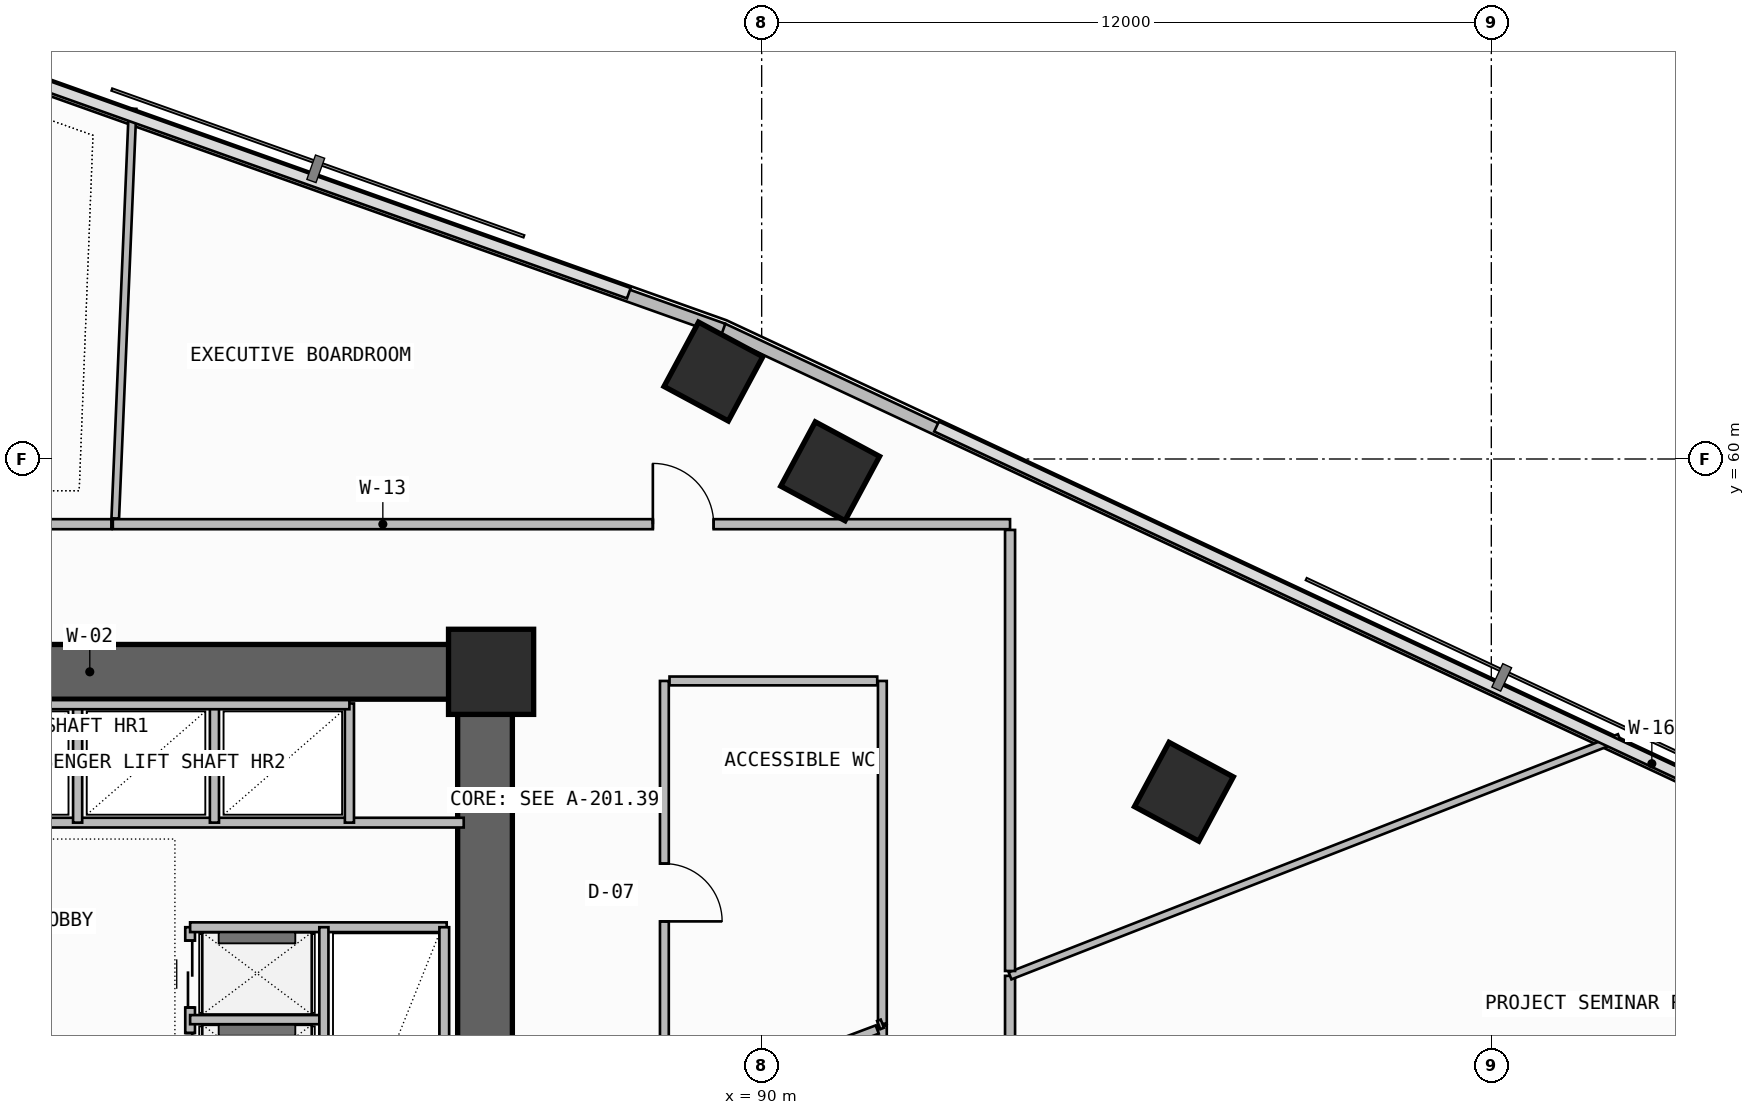
"""IFC4 building model, lengths in metres.
Left out: names, types, materials, properties, quantities, classifications, styles, units other than length and angle.
Written with IfcOpenShell. Run it as: python <this file> out.ifc"""

import sys

from ifc_helpers import new_model, si_unit, direction, frame, frame_2d, origin, origin_2d, place, context, subcontext, project, spatial, rectangle, extrude, element, fill, save


model = new_model("IFC4")
c1 = context("Model", 3, precision=1e-05, world=origin(), true_north=direction((0.0, 1.0)))
c2 = subcontext(c1, "Body", "Model", "MODEL_VIEW")
j1 = project(units=[si_unit("LENGTHUNIT", "METRE"), si_unit("PLANEANGLEUNIT", "RADIAN")], contexts=[c1])
p1 = place(None, origin())
s1 = spatial("IfcSite", under=j1, at=p1, CompositionType="ELEMENT")
p2 = place(p1, origin())
s2 = spatial("IfcBuilding", under=s1, at=p2, CompositionType="ELEMENT")
p3 = place(p2, frame((0.0, 0.0, 139.5)))
s3 = spatial("IfcBuildingStorey", under=s2, at=p3, CompositionType="ELEMENT", Elevation=139.5)
p4 = place(p3, frame((72.0, 56.5, -0.26), z_axis=(0.0, 0.0, 1.0), x_axis=(1.0, 0.0, 0.0)))
e1 = element("IfcWall", 1, at=p4, inside=s3, PredefinedType="SHEAR", context=c2, shape_type="SweptSolid", body=[
    extrude(rectangle(XDim=13.9, YDim=0.9, at=frame_2d((6.95, 0.0))), origin(), (0.0, 0.0, 1.0), 3.6),
])
p5 = place(p3, frame((85.45, 47.6, -0.26), z_axis=(0.0, 0.0, 1.0), x_axis=(0.0, 1.0, 0.0)))
e2 = element("IfcWall", 2, at=p5, inside=s3, PredefinedType="SHEAR", context=c2, shape_type="SweptSolid", body=[
    extrude(rectangle(XDim=8.45, YDim=0.9, at=frame_2d((4.225, 0.0))), origin(), (0.0, 0.0, 1.0), 3.6),
])
p6 = place(p3, frame((85.55, 56.5, 0.0), z_axis=(0.0, 0.0, 1.0), x_axis=(1.0, 0.0, 0.0)))
e3 = element("IfcColumn", 3, at=p6, inside=s3, PredefinedType="COLUMN", context=c2, shape_type="SweptSolid", body=[
    extrude(rectangle(XDim=1.4, YDim=1.4, at=origin_2d()), origin(), (0.0, 0.0, 1.0), 3.6),
])
for number, where, z_axis, x_axis in (
    (4, (96.944, 54.528, 0.0), (0.0, 0.0, 1.0), (0.473, 0.881, 0.0)),
    (5, (91.126, 59.798, 0.0), (0.0, 0.0, 1.0), (0.473, 0.881, 0.0)),
    (6, (89.207, 61.438, 0.0), (0.0, 0.0, 1.0), (0.473, 0.881, 0.0)),
):
    element("IfcColumn", number, at=place(p3, frame(where, z_axis=z_axis, x_axis=x_axis)), inside=s3, PredefinedType="COLUMN", context=c2, shape_type="SweptSolid", body=[
        extrude(rectangle(XDim=1.2, YDim=1.2, at=origin_2d()), origin(), (0.0, 0.0, 1.0), 3.6),
    ])
p7 = place(p3, frame((119.926, 47.843, 0.0), z_axis=(0.0, 0.0, 1.0), x_axis=(-0.905880730846, 0.423532881228, 0.0)))
e7 = element("IfcWall", 7, at=p7, inside=s3, PredefinedType="PARAPET", context=c2, shape_type="SweptSolid", body=[
    extrude(rectangle(XDim=33.748, YDim=0.2, at=frame_2d((16.874, 0.0))), origin(), (0.0, 0.0, 1.0), 1.15),
])
p8 = place(p3, frame((89.368, 62.13, 0.0), z_axis=(0.0, 0.0, 1.0), x_axis=(-0.942033439765, 0.335518998515, 0.0)))
e8 = element("IfcWall", 8, at=p8, inside=s3, PredefinedType="PARAPET", context=c2, shape_type="SweptSolid", body=[
    extrude(rectangle(XDim=27.969, YDim=0.2, at=frame_2d((13.985, 0.0))), origin(), (0.0, 0.0, 1.0), 1.15),
])
p9 = place(p3, frame((80.6, 47.7, 0.0), z_axis=(0.0, 0.0, 1.0), x_axis=(0.0, 1.0, 0.0)))
e9 = element("IfcWall", 9, at=p9, inside=s3, PredefinedType="SOLIDWALL", context=c2, shape_type="SweptSolid", body=[
    extrude(rectangle(XDim=4.6, YDim=0.16, at=frame_2d((2.3, 0.0))), origin(), (0.0, 0.0, 1.0), 3.34),
])
p10 = place(p9, frame((0.24, 0.0, 0.0)))
e10 = element("IfcOpeningElement", 10, at=p10, cuts=e9, PredefinedType="OPENING", context=c2, shape_type="SweptSolid", body=[
    extrude(rectangle(XDim=1.1, YDim=2.25, at=frame_2d((0.55, 1.125))), frame((0.0, 0.09, 0.0), z_axis=(0.0, -1.0, 0.0), x_axis=(1.0, 0.0, 0.0)), (0.0, 0.0, 1.0), 0.18),
])
p11 = place(p9, frame((1.76, 0.0, 0.0)))
e11 = element("IfcOpeningElement", 11, at=p11, cuts=e9, PredefinedType="OPENING", context=c2, shape_type="SweptSolid", body=[
    extrude(rectangle(XDim=1.1, YDim=2.25, at=frame_2d((0.55, 1.125))), frame((0.0, 0.09, 0.0), z_axis=(0.0, -1.0, 0.0), x_axis=(1.0, 0.0, 0.0)), (0.0, 0.0, 1.0), 0.18),
])
p12 = place(p9, frame((3.28, 0.0, 0.0)))
e12 = element("IfcOpeningElement", 12, at=p12, cuts=e9, PredefinedType="OPENING", context=c2, shape_type="SweptSolid", body=[
    extrude(rectangle(XDim=1.1, YDim=2.25, at=frame_2d((0.55, 1.125))), frame((0.0, 0.09, 0.0), z_axis=(0.0, -1.0, 0.0), x_axis=(1.0, 0.0, 0.0)), (0.0, 0.0, 1.0), 0.18),
])
p13 = place(p3, frame((80.6, 52.3, 0.0), z_axis=(0.0, 0.0, 1.0), x_axis=(1.0, 0.0, 0.0)))
e13 = element("IfcWall", 13, at=p13, inside=s3, PredefinedType="SOLIDWALL", context=c2, shape_type="SweptSolid", body=[
    extrude(rectangle(XDim=4.22, YDim=0.16, at=frame_2d((2.11, 0.0))), origin(), (0.0, 0.0, 1.0), 3.34),
])
p14 = place(p3, frame((80.6, 50.78, 0.0), z_axis=(0.0, 0.0, 1.0), x_axis=(1.0, 0.0, 0.0)))
e14 = element("IfcWall", 14, at=p14, inside=s3, PredefinedType="PLUMBINGWALL", context=c2, shape_type="SweptSolid", body=[
    extrude(rectangle(XDim=2.2, YDim=0.15, at=frame_2d((1.1, 0.0))), origin(), (0.0, 0.0, 1.0), 3.34),
])
p15 = place(p3, frame((82.8, 47.7, 0.0), z_axis=(0.0, 0.0, 1.0), x_axis=(0.0, 1.0, 0.0)))
e15 = element("IfcWall", 15, at=p15, inside=s3, PredefinedType="PLUMBINGWALL", context=c2, shape_type="SweptSolid", body=[
    extrude(rectangle(XDim=4.6, YDim=0.15, at=frame_2d((2.3, 0.0))), origin(), (0.0, 0.0, 1.0), 3.34),
])
p16 = place(p3, frame((84.78, 47.7, 0.0), z_axis=(0.0, 0.0, 1.0), x_axis=(0.0, 1.0, 0.0)))
e16 = element("IfcWall", 16, at=p16, inside=s3, PredefinedType="SOLIDWALL", context=c2, shape_type="SweptSolid", body=[
    extrude(rectangle(XDim=4.6, YDim=0.16, at=frame_2d((2.3, 0.0))), origin(), (0.0, 0.0, 1.0), 3.34),
])
p17 = place(p3, frame((73.02, 54.02, 0.0), z_axis=(0.0, 0.0, 1.0), x_axis=(1.0, 0.0, 0.0)))
e17 = element("IfcWall", 17, at=p17, inside=s3, PredefinedType="SOLIDWALL", context=c2, shape_type="SweptSolid", body=[
    extrude(rectangle(XDim=12.08, YDim=0.16, at=frame_2d((6.04, 0.0))), origin(), (0.0, 0.0, 1.0), 3.34),
])
for number, where, z_axis, x_axis in (
    (18, (78.75, 54.02, 0.0), (0.0, 0.0, 1.0), (0.0, 1.0, 0.0)),
    (19, (81.0, 54.02, 0.0), (0.0, 0.0, 1.0), (0.0, 1.0, 0.0)),
):
    element("IfcWall", number, at=place(p3, frame(where, z_axis=z_axis, x_axis=x_axis)), inside=s3, PredefinedType="PLUMBINGWALL", context=c2, shape_type="SweptSolid", body=[
        extrude(rectangle(XDim=1.96, YDim=0.15, at=frame_2d((0.98, 0.0))), origin(), (0.0, 0.0, 1.0), 3.34),
    ])
p18 = place(p3, frame((83.22, 54.02, 0.0), z_axis=(0.0, 0.0, 1.0), x_axis=(0.0, 1.0, 0.0)))
e20 = element("IfcWall", 20, at=p18, inside=s3, PredefinedType="SOLIDWALL", context=c2, shape_type="SweptSolid", body=[
    extrude(rectangle(XDim=1.96, YDim=0.15, at=frame_2d((0.98, 0.0))), origin(), (0.0, 0.0, 1.0), 3.34),
])
p19 = place(p3, frame((76.52, 55.96, 0.0), z_axis=(0.0, 0.0, 1.0), x_axis=(1.0, 0.0, 0.0)))
e21 = element("IfcWall", 21, at=p19, inside=s3, PredefinedType="SOLIDWALL", context=c2, shape_type="SweptSolid", body=[
    extrude(rectangle(XDim=6.7, YDim=0.15, at=frame_2d((3.35, 0.0))), origin(), (0.0, 0.0, 1.0), 3.34),
])
p20 = place(p3, frame((94.085, 46.51, 0.0), z_axis=(0.0, 0.0, 1.0), x_axis=(0.0, 1.0, 0.0)))
e22 = element("IfcWall", 22, at=p20, inside=s3, PredefinedType="PARTITIONING", context=c2, shape_type="SweptSolid", body=[
    extrude(rectangle(XDim=4.991, YDim=0.165, at=frame_2d((2.496, 0.0))), origin(), (0.0, 0.0, 1.0), 2.725),
])
p21 = place(p20, frame((1.996, 0.0, 0.0)))
e23 = element("IfcOpeningElement", 23, at=p21, cuts=e22, PredefinedType="OPENING", context=c2, shape_type="SweptSolid", body=[
    extrude(rectangle(XDim=1.0, YDim=2.2, at=frame_2d((0.5, 1.1))), frame((0.0, 0.093, 0.0), z_axis=(0.0, -1.0, 0.0), x_axis=(1.0, 0.0, 0.0)), (0.0, 0.0, 1.0), 0.185),
])
p22 = place(p3, frame((94.085, 51.5, 0.0), z_axis=(0.0, 0.0, 1.0), x_axis=(0.931423458571, 0.363937275948, 0.0)))
e24 = element("IfcWall", 24, at=p22, inside=s3, PredefinedType="PARTITIONING", context=c2, shape_type="SweptSolid", body=[
    extrude(rectangle(XDim=10.759, YDim=0.125, at=frame_2d((5.379, 0.0))), origin(), (0.0, 0.0, 1.0), 2.725),
])
p23 = place(p3, frame((91.985, 50.688, 0.0), z_axis=(0.0, 0.0, 1.0), x_axis=(0.0, -1.0, 0.0)))
e25 = element("IfcWall", 25, at=p23, inside=s3, PredefinedType="PARTITIONING", context=c2, shape_type="SweptSolid", body=[
    extrude(rectangle(XDim=8.565, YDim=0.145, at=frame_2d((4.283, 0.0))), origin(), (0.0, 0.0, 1.0), 2.725),
])
p24 = place(p23, frame((3.833, 0.0, 0.0)))
e26 = element("IfcOpeningElement", 26, at=p24, cuts=e25, PredefinedType="OPENING", context=c2, shape_type="SweptSolid", body=[
    extrude(rectangle(XDim=0.9, YDim=2.1, at=frame_2d((0.45, 1.05))), frame((0.0, 0.083, 0.0), z_axis=(0.0, -1.0, 0.0), x_axis=(1.0, 0.0, 0.0)), (0.0, 0.0, 1.0), 0.165),
])
p25 = place(p3, frame((88.46, 49.324, 0.0), z_axis=(0.0, 0.0, 1.0), x_axis=(0.935982041956, 0.352047748376, 0.0)))
e27 = element("IfcWall", 27, at=p25, inside=s3, PredefinedType="PARTITIONING", context=c2, shape_type="SweptSolid", body=[
    extrude(rectangle(XDim=3.676, YDim=0.145, at=frame_2d((1.838, 0.0))), origin(), (0.0, 0.0, 1.0), 2.925),
])
p26 = place(p3, frame((88.4, 49.392, 0.0), z_axis=(0.0, 0.0, 1.0), x_axis=(0.0, 1.0, 0.0)))
e28 = element("IfcWall", 28, at=p26, inside=s3, PredefinedType="PARTITIONING", context=c2, shape_type="SweptSolid", body=[
    extrude(rectangle(XDim=6.958, YDim=0.145, at=frame_2d((3.479, 0.0))), origin(), (0.0, 0.0, 1.0), 2.725),
])
p27 = place(p26, frame((3.004, 0.0, 0.0)))
e29 = element("IfcOpeningElement", 29, at=p27, cuts=e28, PredefinedType="OPENING", context=c2, shape_type="SweptSolid", body=[
    extrude(rectangle(XDim=0.95, YDim=2.15, at=frame_2d((0.475, 1.075))), frame((0.0, 0.083, 0.0), z_axis=(0.0, -1.0, 0.0), x_axis=(1.0, 0.0, 0.0)), (0.0, 0.0, 1.0), 0.165),
])
p28 = place(p3, frame((91.985, 56.35, 0.0), z_axis=(0.0, 0.0, 1.0), x_axis=(0.0, -1.0, 0.0)))
e30 = element("IfcWall", 30, at=p28, inside=s3, PredefinedType="PARTITIONING", context=c2, shape_type="SweptSolid", body=[
    extrude(rectangle(XDim=5.636, YDim=0.145, at=frame_2d((2.818, 0.0))), origin(), (0.0, 0.0, 1.0), 2.725),
])
p29 = place(p3, frame((88.485, 56.35, 0.0), z_axis=(0.0, 0.0, 1.0), x_axis=(1.0, 0.0, 0.0)))
e31 = element("IfcWall", 31, at=p29, inside=s3, PredefinedType="PARTITIONING", context=c2, shape_type="SweptSolid", body=[
    extrude(rectangle(XDim=3.416, YDim=0.145, at=frame_2d((1.708, 0.0))), origin(), (0.0, 0.0, 1.0), 2.925),
])
p30 = place(p3, frame((91.985, 50.714, 0.0), z_axis=(0.0, 0.0, 1.0), x_axis=(-0.931577619485, -0.363542485653, 0.0)))
e32 = element("IfcWall", 32, at=p30, inside=s3, PredefinedType="PARTITIONING", context=c2, shape_type="SweptSolid", body=[
    extrude(rectangle(XDim=0.064, YDim=0.145, at=frame_2d((0.032, 0.0))), origin(), (0.0, 0.0, 1.0), 2.925),
])
p31 = place(p3, frame((94.085, 58.928, 0.0), z_axis=(0.0, 0.0, 1.0), x_axis=(-1.0, 0.0, 0.0)))
e33 = element("IfcWall", 33, at=p31, inside=s3, PredefinedType="PARTITIONING", context=c2, shape_type="SweptSolid", body=[
    extrude(rectangle(XDim=14.756, YDim=0.165, at=frame_2d((7.378, 0.0))), origin(), (0.0, 0.0, 1.0), 2.725),
])
p32 = place(p31, frame((4.875, 0.0, 0.0)))
e34 = element("IfcOpeningElement", 34, at=p32, cuts=e33, PredefinedType="OPENING", context=c2, shape_type="SweptSolid", body=[
    extrude(rectangle(XDim=1.0, YDim=2.2, at=frame_2d((0.5, 1.1))), frame((0.0, 0.093, 0.0), z_axis=(0.0, -1.0, 0.0), x_axis=(1.0, 0.0, 0.0)), (0.0, 0.0, 1.0), 0.185),
])
p33 = place(p3, frame((94.085, 51.581, 0.0), z_axis=(0.0, 0.0, 1.0), x_axis=(0.0, 1.0, 0.0)))
e35 = element("IfcWall", 35, at=p33, inside=s3, PredefinedType="PARTITIONING", context=c2, shape_type="SweptSolid", body=[
    extrude(rectangle(XDim=7.253, YDim=0.165, at=frame_2d((3.626, 0.0))), origin(), (0.0, 0.0, 1.0), 2.725),
])
p34 = place(p3, frame((79.369, 59.022, 0.0), z_axis=(0.0, 0.0, 1.0), x_axis=(0.042284055913, 0.999105629358, 0.0)))
e36 = element("IfcWall", 36, at=p34, inside=s3, PredefinedType="PARTITIONING", context=c2, shape_type="SweptSolid", body=[
    extrude(rectangle(XDim=6.744, YDim=0.125, at=frame_2d((3.372, 0.0))), origin(), (0.0, 0.0, 1.0), 3.34),
])
p35 = place(p3, frame((79.305, 58.928, 0.0), z_axis=(0.0, 0.0, 1.0), x_axis=(-1.0, 0.0, 0.0)))
e37 = element("IfcWall", 37, at=p35, inside=s3, PredefinedType="PARTITIONING", context=c2, shape_type="SweptSolid", body=[
    extrude(rectangle(XDim=9.94, YDim=0.165, at=frame_2d((4.97, 0.0))), origin(), (0.0, 0.0, 1.0), 2.725),
])
p36 = place(p35, frame((3.189, 0.0, 0.0)))
e38 = element("IfcOpeningElement", 38, at=p36, cuts=e37, PredefinedType="OPENING", context=c2, shape_type="SweptSolid", body=[
    extrude(rectangle(XDim=1.0, YDim=2.2, at=frame_2d((0.5, 1.1))), frame((0.0, 0.093, 0.0), z_axis=(0.0, -1.0, 0.0), x_axis=(1.0, 0.0, 0.0)), (0.0, 0.0, 1.0), 0.185),
])
p37 = place(p11, frame((1.1, 0.0, 0.0), z_axis=(0.0, 0.0, 1.0), x_axis=(-1.0, 0.0, 0.0)))
e39 = element("IfcDoor", 39, at=p37, inside=s3, OperationType="DOUBLE_DOOR_SLIDING", PredefinedType="DOOR", context=c2, shape_type="SweptSolid", body=[
    extrude(rectangle(XDim=1.1, YDim=2.25, at=frame_2d((0.55, 1.125))), frame((0.0, 0.025, 0.0), z_axis=(0.0, -1.0, 0.0), x_axis=(1.0, 0.0, 0.0)), (0.0, 0.0, 1.0), 0.05),
])
fill(e11, e39)
p38 = place(p12, frame((1.1, 0.0, 0.0), z_axis=(0.0, 0.0, 1.0), x_axis=(-1.0, 0.0, 0.0)))
e40 = element("IfcDoor", 40, at=p38, inside=s3, OperationType="DOUBLE_DOOR_SLIDING", PredefinedType="DOOR", context=c2, shape_type="SweptSolid", body=[
    extrude(rectangle(XDim=1.1, YDim=2.25, at=frame_2d((0.55, 1.125))), frame((0.0, 0.025, 0.0), z_axis=(0.0, -1.0, 0.0), x_axis=(1.0, 0.0, 0.0)), (0.0, 0.0, 1.0), 0.05),
])
fill(e12, e40)
p39 = place(p27, frame((0.95, 0.0, 0.0), z_axis=(0.0, 0.0, 1.0), x_axis=(-1.0, 0.0, 0.0)))
e41 = element("IfcDoor", 41, at=p39, inside=s3, OperationType="SINGLE_SWING_RIGHT", PredefinedType="DOOR", context=c2, shape_type="SweptSolid", body=[
    extrude(rectangle(XDim=0.95, YDim=2.15, at=frame_2d((0.475, 1.075))), frame((0.0, 0.025, 0.0), z_axis=(0.0, -1.0, 0.0), x_axis=(1.0, 0.0, 0.0)), (0.0, 0.0, 1.0), 0.05),
])
fill(e29, e41)
p40 = place(p32, frame((1.0, 0.0, 0.0), z_axis=(0.0, 0.0, 1.0), x_axis=(-1.0, 0.0, 0.0)))
e42 = element("IfcDoor", 42, at=p40, inside=s3, OperationType="SINGLE_SWING_LEFT", PredefinedType="DOOR", context=c2, shape_type="SweptSolid", body=[
    extrude(rectangle(XDim=1.0, YDim=2.2, at=frame_2d((0.5, 1.1))), frame((0.0, 0.025, 0.0), z_axis=(0.0, -1.0, 0.0), x_axis=(1.0, 0.0, 0.0)), (0.0, 0.0, 1.0), 0.05),
])
fill(e34, e42)
save(model, sys.argv[1])
